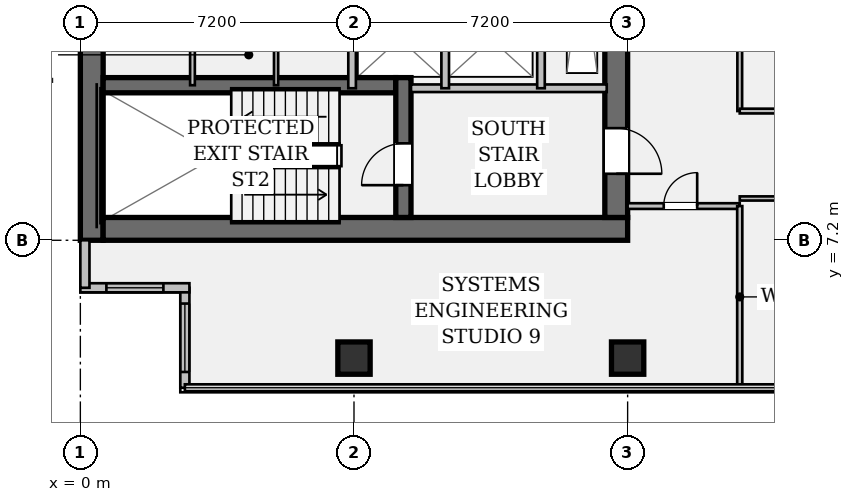
"""IFC4 building model, lengths in metres.
Left out: names, types, materials, properties, quantities, classifications, styles, units other than length and angle.
Written with IfcOpenShell. Run it as: python <this file> out.ifc"""

import sys

from ifc_helpers import new_model, si_unit, direction, frame, frame_2d, origin, origin_2d, place, context, subcontext, project, spatial, rectangle, hollow_rectangle, extrude, element, fill, save


model = new_model("IFC4")
c1 = context("Model", 3, precision=1e-05, world=origin(), true_north=direction((0.0, 1.0)))
c2 = subcontext(c1, "Body", "Model", "MODEL_VIEW")
j1 = project(units=[si_unit("LENGTHUNIT", "METRE"), si_unit("PLANEANGLEUNIT", "RADIAN")], contexts=[c1])
p1 = place(None, origin())
s1 = spatial("IfcSite", under=j1, at=p1, CompositionType="ELEMENT")
p2 = place(p1, origin())
s2 = spatial("IfcBuilding", under=s1, at=p2, CompositionType="ELEMENT")
p3 = place(p2, frame((0.0, 0.0, 152.25)))
s3 = spatial("IfcBuildingStorey", under=s2, at=p3, CompositionType="ELEMENT", Elevation=152.25)
p4 = place(p3, frame((0.3, 7.2, 0.0), z_axis=(0.0, 0.0, 1.0), x_axis=(0.0, 1.0, 0.0)))
e1 = element("IfcWall", 1, at=p4, inside=s3, PredefinedType="SHEAR", context=c2, shape_type="SweptSolid", body=[
    extrude(rectangle(XDim=28.8, YDim=0.6, at=frame_2d((14.4, 0.0))), origin(), (0.0, 0.0, 1.0), 3.58),
])
p5 = place(p3, frame((0.6, 7.5, 0.0), z_axis=(0.0, 0.0, 1.0), x_axis=(1.0, 0.0, 0.0)))
e2 = element("IfcWall", 2, at=p5, inside=s3, PredefinedType="SHEAR", context=c2, shape_type="SweptSolid", body=[
    extrude(rectangle(XDim=13.8, YDim=0.6, at=frame_2d((6.9, 0.0))), origin(), (0.0, 0.0, 1.0), 3.58),
])
p6 = place(p3, frame((14.1, 35.4, 0.0), z_axis=(0.0, 0.0, 1.0), x_axis=(0.0, -1.0, 0.0)))
e3 = element("IfcWall", 3, at=p6, inside=s3, PredefinedType="SHEAR", context=c2, shape_type="SweptSolid", body=[
    extrude(rectangle(XDim=27.6, YDim=0.6, at=frame_2d((13.8, 0.0))), origin(), (0.0, 0.0, 1.0), 3.58),
])
p7 = place(p6, frame((1.3, 0.0, 0.0)))
e4 = element("IfcOpeningElement", 4, at=p7, cuts=e3, PredefinedType="OPENING", context=c2, shape_type="SweptSolid", body=[
    extrude(rectangle(XDim=1.2, YDim=2.15, at=frame_2d((0.6, 1.075))), frame((0.0, 0.312, 0.0), z_axis=(0.0, -1.0, 0.0), x_axis=(1.0, 0.0, 0.0)), (0.0, 0.0, 1.0), 0.624),
])
p8 = place(p6, frame((25.25, 0.0, 0.0)))
e5 = element("IfcOpeningElement", 5, at=p8, cuts=e3, PredefinedType="OPENING", context=c2, shape_type="SweptSolid", body=[
    extrude(rectangle(XDim=1.2, YDim=2.15, at=frame_2d((0.6, 1.075))), frame((0.0, 0.312, 0.0), z_axis=(0.0, -1.0, 0.0), x_axis=(1.0, 0.0, 0.0)), (0.0, 0.0, 1.0), 0.624),
])
p9 = place(p6, frame((14.6, 0.0, 0.0)))
e6 = element("IfcOpeningElement", 6, at=p9, cuts=e3, PredefinedType="OPENING", context=c2, shape_type="SweptSolid", body=[
    extrude(rectangle(XDim=1.6, YDim=2.2, at=frame_2d((0.8, 1.1))), frame((0.0, 0.312, 0.0), z_axis=(0.0, -1.0, 0.0), x_axis=(1.0, 0.0, 0.0)), (0.0, 0.0, 1.0), 0.624),
])
p10 = place(p3, frame((0.6, 11.28, 0.0), z_axis=(0.0, 0.0, 1.0), x_axis=(1.0, 0.0, 0.0)))
e7 = element("IfcWall", 7, at=p10, inside=s3, PredefinedType="SHEAR", context=c2, shape_type="SweptSolid", body=[
    extrude(rectangle(XDim=7.7, YDim=0.4, at=frame_2d((3.85, 0.0))), origin(), (0.0, 0.0, 1.0), 3.58),
])
p11 = place(p3, frame((8.5, 7.8, 0.0), z_axis=(0.0, 0.0, 1.0), x_axis=(0.0, 1.0, 0.0)))
e8 = element("IfcWall", 8, at=p11, inside=s3, PredefinedType="SHEAR", context=c2, shape_type="SweptSolid", body=[
    extrude(rectangle(XDim=3.68, YDim=0.4, at=frame_2d((1.84, 0.0))), origin(), (0.0, 0.0, 1.0), 3.58),
])
p12 = place(p11, frame((0.85, 0.0, 0.0)))
e9 = element("IfcOpeningElement", 9, at=p12, cuts=e8, PredefinedType="OPENING", context=c2, shape_type="SweptSolid", body=[
    extrude(rectangle(XDim=1.1, YDim=2.15, at=frame_2d((0.55, 1.075))), frame((0.0, 0.212, 0.0), z_axis=(0.0, -1.0, 0.0), x_axis=(1.0, 0.0, 0.0)), (0.0, 0.0, 1.0), 0.424),
])
for number, where, z_axis, x_axis in (
    (10, (7.2, 4.1, 0.0), (0.0, 0.0, 1.0), (1.0, 0.0, 0.0)),
    (11, (14.4, 4.1, 0.0), (0.0, 0.0, 1.0), (1.0, 0.0, 0.0)),
):
    element("IfcColumn", number, at=place(p3, frame(where, z_axis=z_axis, x_axis=x_axis)), inside=s3, PredefinedType="COLUMN", context=c2, shape_type="SweptSolid", body=[
        extrude(hollow_rectangle(XDim=0.85, YDim=0.85, WallThickness=0.05, at=origin_2d()), origin(), (0.0, 0.0, 1.0), 3.58),
    ])
p13 = place(p3, frame((2.75, 3.32, 0.0), z_axis=(0.0, 0.0, 1.0), x_axis=(0.0, 1.0, 0.0)))
e12 = element("IfcWall", 12, at=p13, inside=s3, PredefinedType="STANDARD", context=c2, shape_type="SweptSolid", body=[
    extrude(rectangle(XDim=2.63, YDim=0.24, at=frame_2d((1.315, 0.0))), origin(), (0.0, 0.0, 1.0), 3.58),
])
p14 = place(p13, frame((0.415, 0.0, 0.95)))
e13 = element("IfcOpeningElement", 13, at=p14, cuts=e12, PredefinedType="OPENING", context=c2, shape_type="SweptSolid", body=[
    extrude(rectangle(XDim=1.8, YDim=1.35, at=frame_2d((0.9, 0.675))), frame((0.0, 0.132, 0.0), z_axis=(0.0, -1.0, 0.0), x_axis=(1.0, 0.0, 0.0)), (0.0, 0.0, 1.0), 0.264),
])
p15 = place(p3, frame((2.87, 5.95, 0.0), z_axis=(0.0, 0.0, 1.0), x_axis=(-1.0, 0.0, 0.0)))
e14 = element("IfcWall", 14, at=p15, inside=s3, PredefinedType="STANDARD", context=c2, shape_type="SweptSolid", body=[
    extrude(rectangle(XDim=2.87, YDim=0.24, at=frame_2d((1.435, 0.0))), origin(), (0.0, 0.0, 1.0), 3.58),
])
p16 = place(p15, frame((0.685, 0.0, 0.95)))
e15 = element("IfcOpeningElement", 15, at=p16, cuts=e14, PredefinedType="OPENING", context=c2, shape_type="SweptSolid", body=[
    extrude(rectangle(XDim=1.5, YDim=1.8, at=frame_2d((0.75, 0.9))), frame((0.0, 0.132, 0.0), z_axis=(0.0, -1.0, 0.0), x_axis=(1.0, 0.0, 0.0)), (0.0, 0.0, 1.0), 0.264),
])
p17 = place(p3, frame((0.12, 5.95, 0.0), z_axis=(0.0, 0.0, 1.0), x_axis=(0.0, 1.0, 0.0)))
e16 = element("IfcWall", 16, at=p17, inside=s3, PredefinedType="STANDARD", context=c2, shape_type="SweptSolid", body=[
    extrude(rectangle(XDim=1.25, YDim=0.24, at=frame_2d((0.625, 0.0))), origin(), (0.0, 0.0, 1.0), 3.58),
])
p18 = place(p3, frame((8.7, 11.2, 0.0), z_axis=(0.0, 0.0, 1.0), x_axis=(1.0, 0.0, 0.0)))
e17 = element("IfcWall", 17, at=p18, inside=s3, PredefinedType="PARTITIONING", context=c2, shape_type="SweptSolid", body=[
    extrude(rectangle(XDim=5.15, YDim=0.2, at=frame_2d((2.575, 0.0))), origin(), (0.0, 0.0, 1.0), 3.58),
])
for number, where, z_axis, x_axis in (
    (18, (7.15, 11.2, 0.0), (0.0, 0.0, 1.0), (0.0, 1.0, 0.0)),
    (19, (9.6, 11.2, 0.0), (0.0, 0.0, 1.0), (0.0, 1.0, 0.0)),
):
    element("IfcWall", number, at=place(p3, frame(where, z_axis=z_axis, x_axis=x_axis)), inside=s3, PredefinedType="PARTITIONING", context=c2, shape_type="SweptSolid", body=[
        extrude(rectangle(XDim=2.4, YDim=0.2, at=frame_2d((1.2, 0.0))), origin(), (0.0, 0.0, 1.0), 3.58),
    ])
p19 = place(p3, frame((12.12, 11.2, 0.0), z_axis=(0.0, 0.0, 1.0), x_axis=(0.0, 1.0, 0.0)))
e20 = element("IfcWall", 20, at=p19, inside=s3, PredefinedType="PARTITIONING", context=c2, shape_type="SweptSolid", body=[
    extrude(rectangle(XDim=6.6, YDim=0.2, at=frame_2d((3.3, 0.0))), origin(), (0.0, 0.0, 1.0), 3.58),
])
p20 = place(p19, frame((2.95, 0.0, 0.0)))
e21 = element("IfcOpeningElement", 21, at=p20, cuts=e20, PredefinedType="OPENING", context=c2, shape_type="SweptSolid", body=[
    extrude(rectangle(XDim=0.85, YDim=2.15, at=frame_2d((0.425, 1.075))), frame((0.0, 0.112, 0.0), z_axis=(0.0, -1.0, 0.0), x_axis=(1.0, 0.0, 0.0)), (0.0, 0.0, 1.0), 0.224),
])
p21 = place(p3, frame((5.15, 11.28, 0.0), z_axis=(0.0, 0.0, 1.0), x_axis=(0.0, 1.0, 0.0)))
e22 = element("IfcWall", 22, at=p21, inside=s3, PredefinedType="PARTITIONING", context=c2, shape_type="SweptSolid", body=[
    extrude(rectangle(XDim=4.42, YDim=0.11, at=frame_2d((2.21, 0.0))), origin(), (0.0, 0.0, 1.0), 3.58),
])
p22 = place(p3, frame((2.95, 11.28, 0.0), z_axis=(0.0, 0.0, 1.0), x_axis=(0.0, 1.0, 0.0)))
e23 = element("IfcWall", 23, at=p22, inside=s3, PredefinedType="PARTITIONING", context=c2, shape_type="SweptSolid", body=[
    extrude(rectangle(XDim=4.42, YDim=0.125, at=frame_2d((2.21, 0.0))), origin(), (0.0, 0.0, 1.0), 3.58),
])
p23 = place(p22, frame((1.6, 0.0, 0.0)))
e24 = element("IfcOpeningElement", 24, at=p23, cuts=e23, PredefinedType="OPENING", context=c2, shape_type="SweptSolid", body=[
    extrude(rectangle(XDim=0.85, YDim=2.15, at=frame_2d((0.425, 1.075))), frame((0.0, 0.074, 0.0), z_axis=(0.0, -1.0, 0.0), x_axis=(1.0, 0.0, 0.0)), (0.0, 0.0, 1.0), 0.149),
])
p24 = place(p3, frame((14.4, 8.1, 0.0), z_axis=(0.0, 0.0, 1.0), x_axis=(1.0, 0.0, 0.0)))
e25 = element("IfcWall", 25, at=p24, inside=s3, PredefinedType="PARTITIONING", context=c2, shape_type="SweptSolid", body=[
    extrude(rectangle(XDim=2.95, YDim=0.15, at=frame_2d((1.475, 0.0))), origin(), (0.0, 0.0, 1.0), 3.148),
])
p25 = place(p24, frame((0.95, 0.0, 0.0)))
e26 = element("IfcOpeningElement", 26, at=p25, cuts=e25, PredefinedType="OPENING", context=c2, shape_type="SweptSolid", body=[
    extrude(rectangle(XDim=0.88, YDim=2.15, at=frame_2d((0.44, 1.075))), frame((0.0, 0.087, 0.0), z_axis=(0.0, -1.0, 0.0), x_axis=(1.0, 0.0, 0.0)), (0.0, 0.0, 1.0), 0.174),
])
p26 = place(p3, frame((17.35, 8.3, 0.0), z_axis=(0.0, 0.0, 1.0), x_axis=(1.0, 0.0, 0.0)))
e27 = element("IfcWall", 27, at=p26, inside=s3, PredefinedType="PARTITIONING", context=c2, shape_type="SweptSolid", body=[
    extrude(rectangle(XDim=21.15, YDim=0.11, at=frame_2d((10.575, 0.0))), origin(), (0.0, 0.0, 1.0), 2.869),
])
p27 = place(p26, frame((2.32, 0.0, 0.0)))
e28 = element("IfcOpeningElement", 28, at=p27, cuts=e27, PredefinedType="OPENING", context=c2, shape_type="SweptSolid", body=[
    extrude(rectangle(XDim=0.88, YDim=2.15, at=frame_2d((0.44, 1.075))), frame((0.0, 0.067, 0.0), z_axis=(0.0, -1.0, 0.0), x_axis=(1.0, 0.0, 0.0)), (0.0, 0.0, 1.0), 0.134),
])
p28 = place(p26, frame((9.85, 0.0, 0.0)))
e29 = element("IfcOpeningElement", 29, at=p28, cuts=e27, PredefinedType="OPENING", context=c2, shape_type="SweptSolid", body=[
    extrude(rectangle(XDim=0.88, YDim=2.15, at=frame_2d((0.44, 1.075))), frame((0.0, 0.067, 0.0), z_axis=(0.0, -1.0, 0.0), x_axis=(1.0, 0.0, 0.0)), (0.0, 0.0, 1.0), 0.134),
])
p29 = place(p26, frame((16.8, 0.0, 0.0)))
e30 = element("IfcOpeningElement", 30, at=p29, cuts=e27, PredefinedType="OPENING", context=c2, shape_type="SweptSolid", body=[
    extrude(rectangle(XDim=0.88, YDim=2.15, at=frame_2d((0.44, 1.075))), frame((0.0, 0.067, 0.0), z_axis=(0.0, -1.0, 0.0), x_axis=(1.0, 0.0, 0.0)), (0.0, 0.0, 1.0), 0.134),
])
p30 = place(p3, frame((17.35, 10.6, 0.0), z_axis=(0.0, 0.0, 1.0), x_axis=(0.0, 1.0, 0.0)))
e31 = element("IfcWall", 31, at=p30, inside=s3, PredefinedType="PARTITIONING", context=c2, shape_type="SweptSolid", body=[
    extrude(rectangle(XDim=7.75, YDim=0.125, at=frame_2d((3.875, 0.0))), origin(), (0.0, 0.0, 1.0), 2.869),
])
p31 = place(p3, frame((17.35, 10.6, 0.0), z_axis=(0.0, 0.0, 1.0), x_axis=(1.0, 0.0, 0.0)))
e32 = element("IfcWall", 32, at=p31, inside=s3, PredefinedType="PARTITIONING", context=c2, shape_type="SweptSolid", body=[
    extrude(rectangle(XDim=18.8, YDim=0.125, at=frame_2d((9.4, 0.0))), origin(), (0.0, 0.0, 1.0), 2.869),
])
p32 = place(p3, frame((17.35, 3.32, 0.0), z_axis=(0.0, 0.0, 1.0), x_axis=(0.0, 1.0, 0.0)))
e33 = element("IfcWall", 33, at=p32, inside=s3, PredefinedType="PARTITIONING", context=c2, shape_type="SweptSolid", body=[
    extrude(rectangle(XDim=4.78, YDim=0.135, at=frame_2d((2.39, 0.0))), origin(), (0.0, 0.0, 1.0), 2.869),
])
p33 = place(p14, origin())
e34 = element("IfcWindow", 34, at=p33, inside=s3, PartitioningType="SINGLE_PANEL", PredefinedType="WINDOW", context=c2, shape_type="SweptSolid", body=[
    extrude(rectangle(XDim=1.8, YDim=1.35, at=frame_2d((0.9, 0.675))), frame((0.0, 0.03, 0.0), z_axis=(0.0, -1.0, 0.0), x_axis=(1.0, 0.0, 0.0)), (0.0, 0.0, 1.0), 0.06),
])
fill(e13, e34)
p34 = place(p16, origin())
e35 = element("IfcWindow", 35, at=p34, inside=s3, PartitioningType="SINGLE_PANEL", PredefinedType="WINDOW", context=c2, shape_type="SweptSolid", body=[
    extrude(rectangle(XDim=1.5, YDim=1.8, at=frame_2d((0.75, 0.9))), frame((0.0, 0.03, 0.0), z_axis=(0.0, -1.0, 0.0), x_axis=(1.0, 0.0, 0.0)), (0.0, 0.0, 1.0), 0.06),
])
fill(e15, e35)
p35 = place(p12, origin())
e36 = element("IfcDoor", 36, at=p35, inside=s3, OperationType="SINGLE_SWING_LEFT", PredefinedType="DOOR", context=c2, shape_type="SweptSolid", body=[
    extrude(rectangle(XDim=1.1, YDim=2.15, at=frame_2d((0.55, 1.075))), frame((0.0, 0.025, 0.0), z_axis=(0.0, -1.0, 0.0), x_axis=(1.0, 0.0, 0.0)), (0.0, 0.0, 1.0), 0.05),
])
fill(e9, e36)
p36 = place(p8, origin())
e37 = element("IfcDoor", 37, at=p36, inside=s3, OperationType="SINGLE_SWING_RIGHT", PredefinedType="DOOR", context=c2, shape_type="SweptSolid", body=[
    extrude(rectangle(XDim=1.2, YDim=2.15, at=frame_2d((0.6, 1.075))), frame((0.0, 0.025, 0.0), z_axis=(0.0, -1.0, 0.0), x_axis=(1.0, 0.0, 0.0)), (0.0, 0.0, 1.0), 0.05),
])
fill(e5, e37)
p37 = place(p25, origin())
e38 = element("IfcDoor", 38, at=p37, inside=s3, OperationType="SINGLE_SWING_RIGHT", PredefinedType="DOOR", context=c2, shape_type="SweptSolid", body=[
    extrude(rectangle(XDim=0.88, YDim=2.15, at=frame_2d((0.44, 1.075))), frame((0.0, 0.025, 0.0), z_axis=(0.0, -1.0, 0.0), x_axis=(1.0, 0.0, 0.0)), (0.0, 0.0, 1.0), 0.05),
])
fill(e26, e38)
save(model, sys.argv[1])
